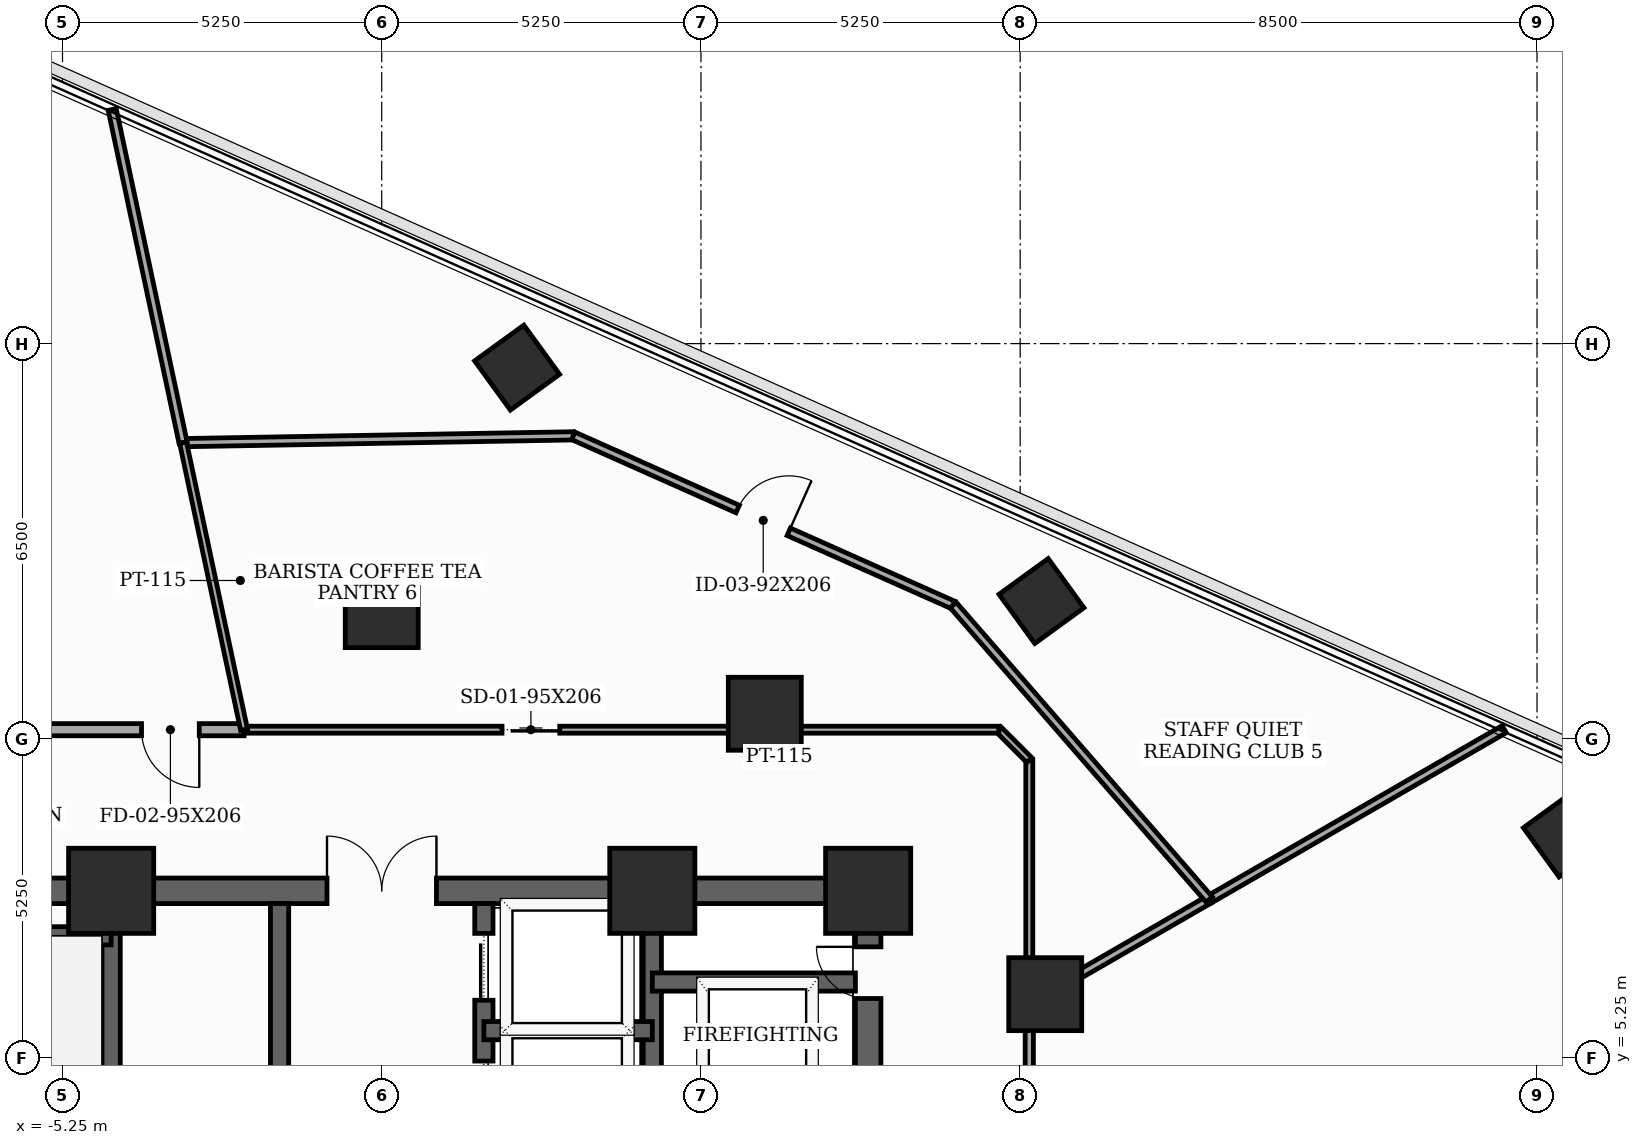
"""IFC4 building model, lengths in metres.
Left out: names, types, materials, properties, quantities, classifications, styles, units other than length and angle.
Written with IfcOpenShell. Run it as: python <this file> out.ifc"""

import sys

from ifc_helpers import new_model, si_unit, direction, frame, frame_2d, origin, origin_2d, place, context, subcontext, project, spatial, rectangle, extrude, element, fill, save


model = new_model("IFC4")
c1 = context("Model", 3, precision=1e-05, world=origin(), true_north=direction((0.0, 1.0)))
c2 = subcontext(c1, "Body", "Model", "MODEL_VIEW")
j1 = project(units=[si_unit("LENGTHUNIT", "METRE"), si_unit("PLANEANGLEUNIT", "RADIAN")], contexts=[c1])
p1 = place(None, origin())
s1 = spatial("IfcSite", under=j1, at=p1, CompositionType="ELEMENT")
p2 = place(p1, origin())
s2 = spatial("IfcBuilding", under=s1, at=p2, CompositionType="ELEMENT")
p3 = place(p2, frame((0.0, 0.0, 180.5)))
s3 = spatial("IfcBuildingStorey", under=s2, at=p3, CompositionType="ELEMENT", Elevation=180.5)
for number, where, z_axis, x_axis in (
    (1, (8.0, 8.0, 0.0), (0.0, 0.0, 1.0), (1.0, 0.0, 0.0)),
    (2, (4.45, 8.0, 0.0), (0.0, 0.0, 1.0), (1.0, 0.0, 0.0)),
    (3, (-4.45, 8.0, 0.0), (0.0, 0.0, 1.0), (1.0, 0.0, 0.0)),
):
    element("IfcColumn", number, at=place(p3, frame(where, z_axis=z_axis, x_axis=x_axis)), inside=s3, PredefinedType="COLUMN", context=c2, shape_type="SweptSolid", body=[
        extrude(rectangle(XDim=1.4, YDim=1.4, at=origin_2d()), origin(), (0.0, 0.0, 1.0), 3.7),
    ])
for number, where, z_axis, x_axis in (
    (4, (10.912, 6.3, 0.0), (0.0, 0.0, 1.0), (1.0, 0.0, 0.0)),
    (5, (6.3, 10.912, 0.0), (0.0, 0.0, 1.0), (1.0, 0.0, 0.0)),
    (6, (0.0, 12.6, 0.0), (0.0, 0.0, 1.0), (1.0, 0.0, 0.0)),
):
    element("IfcColumn", number, at=place(p3, frame(where, z_axis=z_axis, x_axis=x_axis)), inside=s3, PredefinedType="COLUMN", context=c2, shape_type="SweptSolid", body=[
        extrude(rectangle(XDim=1.2, YDim=1.2, at=origin_2d()), origin(), (0.0, 0.0, 1.0), 3.7),
    ])
for number, where, z_axis, x_axis in (
    (7, (19.474, 8.926, 0.0), (0.0, 0.0, 1.0), (0.809, 0.588, 0.0)),
    (8, (10.85, 12.766, 0.0), (0.0, 0.0, 1.0), (0.809, 0.588, 0.0)),
    (9, (2.227, 16.605, 0.0), (0.0, 0.0, 1.0), (0.809, 0.588, 0.0)),
):
    element("IfcColumn", number, at=place(p3, frame(where, z_axis=z_axis, x_axis=x_axis)), inside=s3, PredefinedType="COLUMN", context=c2, shape_type="SweptSolid", body=[
        extrude(rectangle(XDim=1.0, YDim=1.0, at=origin_2d()), origin(), (0.0, 0.0, 1.0), 3.7),
    ])
p4 = place(p3, frame((8.0, -8.0, 0.0), z_axis=(0.0, 0.0, 1.0), x_axis=(0.0, 1.0, 0.0)))
e10 = element("IfcWall", 10, at=p4, inside=s3, PredefinedType="SHEAR", context=c2, shape_type="SweptSolid", body=[
    extrude(rectangle(XDim=16.0, YDim=0.42, at=frame_2d((8.0, 0.0))), origin(), (0.0, 0.0, 1.0), 3.5),
])
p5 = place(p4, frame((9.6, 0.0, 0.0)))
e11 = element("IfcOpeningElement", 11, at=p5, cuts=e10, PredefinedType="OPENING", context=c2, shape_type="SweptSolid", body=[
    extrude(rectangle(XDim=1.05, YDim=2.15, at=frame_2d((0.525, 1.075))), frame((0.0, 0.22, 0.0), z_axis=(0.0, -1.0, 0.0), x_axis=(1.0, 0.0, 0.0)), (0.0, 0.0, 1.0), 0.44),
])
p6 = place(p4, frame((14.229, 0.0, 0.0)))
e12 = element("IfcOpeningElement", 12, at=p6, cuts=e10, PredefinedType="OPENING", context=c2, shape_type="SweptSolid", body=[
    extrude(rectangle(XDim=0.85, YDim=2.02, at=frame_2d((0.425, 1.01))), frame((0.0, 0.22, 0.0), z_axis=(0.0, -1.0, 0.0), x_axis=(1.0, 0.0, 0.0)), (0.0, 0.0, 1.0), 0.44),
])
p7 = place(p3, frame((-8.0, 8.0, 0.0), z_axis=(0.0, 0.0, 1.0), x_axis=(1.0, 0.0, 0.0)))
e13 = element("IfcWall", 13, at=p7, inside=s3, PredefinedType="SHEAR", context=c2, shape_type="SweptSolid", body=[
    extrude(rectangle(XDim=16.0, YDim=0.42, at=frame_2d((8.0, 0.0))), origin(), (0.0, 0.0, 1.0), 3.5),
])
p8 = place(p7, frame((7.1, 0.0, 0.0)))
e14 = element("IfcOpeningElement", 14, at=p8, cuts=e13, PredefinedType="OPENING", context=c2, shape_type="SweptSolid", body=[
    extrude(rectangle(XDim=1.8, YDim=2.15, at=frame_2d((0.9, 1.075))), frame((0.0, 0.22, 0.0), z_axis=(0.0, -1.0, 0.0), x_axis=(1.0, 0.0, 0.0)), (0.0, 0.0, 1.0), 0.44),
])
for number, where, z_axis, x_axis in (
    (15, (-4.45, -7.79, 0.0), (0.0, 0.0, 1.0), (0.0, 1.0, 0.0)),
    (16, (4.45, -7.79, 0.0), (0.0, 0.0, 1.0), (0.0, 1.0, 0.0)),
):
    element("IfcWall", number, at=place(p3, frame(where, z_axis=z_axis, x_axis=x_axis)), inside=s3, PredefinedType="SHEAR", context=c2, shape_type="SweptSolid", body=[
        extrude(rectangle(XDim=15.58, YDim=0.3, at=frame_2d((7.79, 0.0))), origin(), (0.0, 0.0, 1.0), 3.5),
    ])
for number, where, z_axis, x_axis in (
    (17, (-7.79, 7.26, 0.0), (0.0, 0.0, 1.0), (1.0, 0.0, 0.0)),
    (18, (4.45, 6.5, 0.0), (0.0, 0.0, 1.0), (1.0, 0.0, 0.0)),
):
    element("IfcWall", number, at=place(p3, frame(where, z_axis=z_axis, x_axis=x_axis)), inside=s3, PredefinedType="SHEAR", context=c2, shape_type="SweptSolid", body=[
        extrude(rectangle(XDim=3.34, YDim=0.3, at=frame_2d((1.67, 0.0))), origin(), (0.0, 0.0, 1.0), 3.5),
    ])
p9 = place(p3, frame((-1.68, -4.85, 0.0), z_axis=(0.0, 0.0, 1.0), x_axis=(0.0, 1.0, 0.0)))
e19 = element("IfcWall", 19, at=p9, inside=s3, PredefinedType="SHEAR", context=c2, shape_type="SweptSolid", body=[
    extrude(rectangle(XDim=12.64, YDim=0.3, at=frame_2d((6.32, 0.0))), origin(), (0.0, 0.0, 1.0), 3.5),
])
p10 = place(p9, frame((1.05, 0.0, 0.0)))
e20 = element("IfcOpeningElement", 20, at=p10, cuts=e19, PredefinedType="OPENING", context=c2, shape_type="SweptSolid", body=[
    extrude(rectangle(XDim=0.85, YDim=2.02, at=frame_2d((0.425, 1.01))), frame((0.0, 0.16, 0.0), z_axis=(0.0, -1.0, 0.0), x_axis=(1.0, 0.0, 0.0)), (0.0, 0.0, 1.0), 0.32),
])
p11 = place(p9, frame((6.8, 0.0, 0.0)))
e21 = element("IfcOpeningElement", 21, at=p11, cuts=e19, PredefinedType="OPENING", context=c2, shape_type="SweptSolid", body=[
    extrude(rectangle(XDim=0.95, YDim=2.1, at=frame_2d((0.475, 1.05))), frame((0.0, 0.16, 0.0), z_axis=(0.0, -1.0, 0.0), x_axis=(1.0, 0.0, 0.0)), (0.0, 0.0, 1.0), 0.32),
])
p12 = place(p3, frame((1.68, -4.85, 0.0), z_axis=(0.0, 0.0, 1.0), x_axis=(0.0, 1.0, 0.0)))
e22 = element("IfcWall", 22, at=p12, inside=s3, PredefinedType="SHEAR", context=c2, shape_type="SweptSolid", body=[
    extrude(rectangle(XDim=12.64, YDim=0.3, at=frame_2d((6.32, 0.0))), origin(), (0.0, 0.0, 1.0), 3.5),
])
p13 = place(p12, frame((0.55, 0.0, 0.0)))
e23 = element("IfcOpeningElement", 23, at=p13, cuts=e22, PredefinedType="OPENING", context=c2, shape_type="SweptSolid", body=[
    extrude(rectangle(XDim=1.1, YDim=2.1, at=frame_2d((0.55, 1.05))), frame((0.0, 0.16, 0.0), z_axis=(0.0, -1.0, 0.0), x_axis=(1.0, 0.0, 0.0)), (0.0, 0.0, 1.0), 0.32),
])
p14 = place(p12, frame((2.65, 0.0, 0.0)))
e24 = element("IfcOpeningElement", 24, at=p14, cuts=e22, PredefinedType="OPENING", context=c2, shape_type="SweptSolid", body=[
    extrude(rectangle(XDim=1.1, YDim=2.1, at=frame_2d((0.55, 1.05))), frame((0.0, 0.16, 0.0), z_axis=(0.0, -1.0, 0.0), x_axis=(1.0, 0.0, 0.0)), (0.0, 0.0, 1.0), 0.32),
])
p15 = place(p12, frame((4.75, 0.0, 0.0)))
e25 = element("IfcOpeningElement", 25, at=p15, cuts=e22, PredefinedType="OPENING", context=c2, shape_type="SweptSolid", body=[
    extrude(rectangle(XDim=1.1, YDim=2.1, at=frame_2d((0.55, 1.05))), frame((0.0, 0.16, 0.0), z_axis=(0.0, -1.0, 0.0), x_axis=(1.0, 0.0, 0.0)), (0.0, 0.0, 1.0), 0.32),
])
p16 = place(p12, frame((6.85, 0.0, 0.0)))
e26 = element("IfcOpeningElement", 26, at=p16, cuts=e22, PredefinedType="OPENING", context=c2, shape_type="SweptSolid", body=[
    extrude(rectangle(XDim=1.1, YDim=2.1, at=frame_2d((0.55, 1.05))), frame((0.0, 0.16, 0.0), z_axis=(0.0, -1.0, 0.0), x_axis=(1.0, 0.0, 0.0)), (0.0, 0.0, 1.0), 0.32),
])
p17 = place(p12, frame((8.95, 0.0, 0.0)))
e27 = element("IfcOpeningElement", 27, at=p17, cuts=e22, PredefinedType="OPENING", context=c2, shape_type="SweptSolid", body=[
    extrude(rectangle(XDim=1.1, YDim=2.1, at=frame_2d((0.55, 1.05))), frame((0.0, 0.16, 0.0), z_axis=(0.0, -1.0, 0.0), x_axis=(1.0, 0.0, 0.0)), (0.0, 0.0, 1.0), 0.32),
])
p18 = place(p12, frame((11.05, 0.0, 0.0)))
e28 = element("IfcOpeningElement", 28, at=p18, cuts=e22, PredefinedType="OPENING", context=c2, shape_type="SweptSolid", body=[
    extrude(rectangle(XDim=1.1, YDim=2.1, at=frame_2d((0.55, 1.05))), frame((0.0, 0.16, 0.0), z_axis=(0.0, -1.0, 0.0), x_axis=(1.0, 0.0, 0.0)), (0.0, 0.0, 1.0), 0.32),
])
p19 = place(p3, frame((1.68, 5.7, 0.0), z_axis=(0.0, 0.0, 1.0), x_axis=(1.0, 0.0, 0.0)))
e29 = element("IfcWall", 29, at=p19, inside=s3, PredefinedType="SHEAR", context=c2, shape_type="SweptSolid", body=[
    extrude(rectangle(XDim=2.77, YDim=0.3, at=frame_2d((1.385, 0.0))), origin(), (0.0, 0.0, 1.0), 3.5),
])
p20 = place(p3, frame((10.65, -6.149, 0.0), z_axis=(0.0, 0.0, 1.0), x_axis=(0.0, 1.0, 0.0)))
e30 = element("IfcWall", 30, at=p20, inside=s3, PredefinedType="PARTITIONING", context=c2, shape_type="SweptSolid", body=[
    extrude(rectangle(XDim=12.298, YDim=0.135, at=frame_2d((6.149, 0.0))), origin(), (0.0, 0.0, 1.0), 2.885),
])
p21 = place(p20, frame((4.198, 0.0, 0.0)))
e31 = element("IfcOpeningElement", 31, at=p21, cuts=e30, PredefinedType="OPENING", context=c2, shape_type="SweptSolid", body=[
    extrude(rectangle(XDim=0.95, YDim=2.1, at=frame_2d((0.475, 1.05))), frame((0.0, 0.077, 0.0), z_axis=(0.0, -1.0, 0.0), x_axis=(1.0, 0.0, 0.0)), (0.0, 0.0, 1.0), 0.155),
])
p22 = place(p3, frame((10.65, 6.149, 0.0), z_axis=(0.0, 0.0, 1.0), x_axis=(0.0, 1.0, 0.0)))
e32 = element("IfcWall", 32, at=p22, inside=s3, PredefinedType="PARTITIONING", context=c2, shape_type="SweptSolid", body=[
    extrude(rectangle(XDim=4.001, YDim=0.115, at=frame_2d((2.0, 0.0))), origin(), (0.0, 0.0, 1.0), 2.885),
])
p23 = place(p3, frame((10.65, 10.15, 0.0), z_axis=(0.0, 0.0, 1.0), x_axis=(-0.707106781187, 0.707106781187, 0.0)))
e33 = element("IfcWall", 33, at=p23, inside=s3, PredefinedType="PARTITIONING", context=c2, shape_type="SweptSolid", body=[
    extrude(rectangle(XDim=0.707, YDim=0.115, at=frame_2d((0.354, 0.0))), origin(), (0.0, 0.0, 1.0), 3.5),
])
p24 = place(p3, frame((10.15, 10.65, 0.0), z_axis=(0.0, 0.0, 1.0), x_axis=(-1.0, 0.0, 0.0)))
e34 = element("IfcWall", 34, at=p24, inside=s3, PredefinedType="PARTITIONING", context=c2, shape_type="SweptSolid", body=[
    extrude(rectangle(XDim=12.414, YDim=0.115, at=frame_2d((6.207, 0.0))), origin(), (0.0, 0.0, 1.0), 2.085),
])
p25 = place(p24, frame((7.222, 0.0, 0.0)))
e35 = element("IfcOpeningElement", 35, at=p25, cuts=e34, PredefinedType="OPENING", context=c2, shape_type="SweptSolid", body=[
    extrude(rectangle(XDim=0.95, YDim=2.035, at=frame_2d((0.475, 1.018))), frame((0.0, 0.067, 0.0), z_axis=(0.0, -1.0, 0.0), x_axis=(1.0, 0.0, 0.0)), (0.0, 0.0, 1.0), 0.135),
])
p26 = place(p3, frame((-2.264, 10.65, 0.0), z_axis=(0.0, 0.0, 1.0), x_axis=(-1.0, 0.0, 0.0)))
e36 = element("IfcWall", 36, at=p26, inside=s3, PredefinedType="SOLIDWALL", context=c2, shape_type="SweptSolid", body=[
    extrude(rectangle(XDim=6.057, YDim=0.2, at=frame_2d((3.029, 0.0))), origin(), (0.0, 0.0, 1.0), 2.085),
])
p27 = place(p26, frame((0.736, 0.0, 0.0)))
e37 = element("IfcOpeningElement", 37, at=p27, cuts=e36, PredefinedType="OPENING", context=c2, shape_type="SweptSolid", body=[
    extrude(rectangle(XDim=0.95, YDim=2.035, at=frame_2d((0.475, 1.018))), frame((0.0, 0.11, 0.0), z_axis=(0.0, -1.0, 0.0), x_axis=(1.0, 0.0, 0.0)), (0.0, 0.0, 1.0), 0.22),
])
p28 = place(p3, frame((18.46, 10.658, 0.0), z_axis=(0.0, 0.0, 1.0), x_axis=(-0.865978736514, -0.500080821373, 0.0)))
e38 = element("IfcWall", 38, at=p28, inside=s3, PredefinedType="PARTITIONING", context=c2, shape_type="SweptSolid", body=[
    extrude(rectangle(XDim=5.602, YDim=0.135, at=frame_2d((2.801, 0.0))), origin(), (0.0, 0.0, 1.0), 2.085),
])
p29 = place(p3, frame((13.609, 7.857, 0.0), z_axis=(0.0, 0.0, 1.0), x_axis=(-0.866071357471, -0.499920397431, 0.0)))
e39 = element("IfcWall", 39, at=p29, inside=s3, PredefinedType="PARTITIONING", context=c2, shape_type="SweptSolid", body=[
    extrude(rectangle(XDim=3.417, YDim=0.135, at=frame_2d((1.708, 0.0))), origin(), (0.0, 0.0, 1.0), 2.085),
])
p30 = place(p3, frame((-3.267, 15.371, 0.0), z_axis=(0.0, 0.0, 1.0), x_axis=(0.999848218389, 0.017422404658, 0.0)))
e40 = element("IfcWall", 40, at=p30, inside=s3, PredefinedType="PARTITIONING", context=c2, shape_type="SweptSolid", body=[
    extrude(rectangle(XDim=6.418, YDim=0.135, at=frame_2d((3.209, 0.0))), origin(), (0.0, 0.0, 1.0), 2.085),
])
p31 = place(p3, frame((3.15, 15.483, 0.0), z_axis=(0.0, 0.0, 1.0), x_axis=(0.913536073518, -0.406757719511, 0.0)))
e41 = element("IfcWall", 41, at=p31, inside=s3, PredefinedType="PARTITIONING", context=c2, shape_type="SweptSolid", body=[
    extrude(rectangle(XDim=6.839, YDim=0.135, at=frame_2d((3.42, 0.0))), origin(), (0.0, 0.0, 1.0), 2.085),
])
p32 = place(p31, frame((2.96, 0.0, 0.0)))
e42 = element("IfcOpeningElement", 42, at=p32, cuts=e41, PredefinedType="OPENING", context=c2, shape_type="SweptSolid", body=[
    extrude(rectangle(XDim=0.92, YDim=2.035, at=frame_2d((0.46, 1.018))), frame((0.0, 0.077, 0.0), z_axis=(0.0, -1.0, 0.0), x_axis=(1.0, 0.0, 0.0)), (0.0, 0.0, 1.0), 0.155),
])
p33 = place(p3, frame((9.398, 12.701, 0.0), z_axis=(0.0, 0.0, 1.0), x_axis=(0.656069468174, -0.754700505452, 0.0)))
e43 = element("IfcWall", 43, at=p33, inside=s3, PredefinedType="PARTITIONING", context=c2, shape_type="SweptSolid", body=[
    extrude(rectangle(XDim=6.418, YDim=0.135, at=frame_2d((3.209, 0.0))), origin(), (0.0, 0.0, 1.0), 2.085),
])
p34 = place(p3, frame((-4.432, 20.851, 0.0), z_axis=(0.0, 0.0, 1.0), x_axis=(0.208002083798, -0.978128382747, 0.0)))
e44 = element("IfcWall", 44, at=p34, inside=s3, PredefinedType="PARTITIONING", context=c2, shape_type="SweptSolid", body=[
    extrude(rectangle(XDim=5.602, YDim=0.135, at=frame_2d((2.801, 0.0))), origin(), (0.0, 0.0, 1.0), 2.085),
])
p35 = place(p3, frame((-3.267, 15.371, 0.0), z_axis=(0.0, 0.0, 1.0), x_axis=(0.207843026781, -0.978162193207, 0.0)))
e45 = element("IfcWall", 45, at=p35, inside=s3, PredefinedType="PARTITIONING", context=c2, shape_type="SweptSolid", body=[
    extrude(rectangle(XDim=4.827, YDim=0.115, at=frame_2d((2.413, 0.0))), origin(), (0.0, 0.0, 1.0), 2.885),
])
p36 = place(p6, origin())
e46 = element("IfcDoor", 46, at=p36, inside=s3, OperationType="SINGLE_SWING_RIGHT", PredefinedType="TRAPDOOR", context=c2, shape_type="SweptSolid", body=[
    extrude(rectangle(XDim=0.85, YDim=2.02, at=frame_2d((0.425, 1.01))), frame((0.0, 0.025, 0.0), z_axis=(0.0, -1.0, 0.0), x_axis=(1.0, 0.0, 0.0)), (0.0, 0.0, 1.0), 0.05),
])
fill(e12, e46)
p37 = place(p8, origin())
e47 = element("IfcDoor", 47, at=p37, inside=s3, OperationType="DOUBLE_DOOR_SINGLE_SWING", PredefinedType="DOOR", context=c2, shape_type="SweptSolid", body=[
    extrude(rectangle(XDim=1.8, YDim=2.15, at=frame_2d((0.9, 1.075))), frame((0.0, 0.025, 0.0), z_axis=(0.0, -1.0, 0.0), x_axis=(1.0, 0.0, 0.0)), (0.0, 0.0, 1.0), 0.05),
])
fill(e14, e47)
p38 = place(p17, origin())
e48 = element("IfcDoor", 48, at=p38, inside=s3, OperationType="SLIDING_TO_LEFT", PredefinedType="DOOR", context=c2, shape_type="SweptSolid", body=[
    extrude(rectangle(XDim=1.1, YDim=2.1, at=frame_2d((0.55, 1.05))), frame((0.0, 0.025, 0.0), z_axis=(0.0, -1.0, 0.0), x_axis=(1.0, 0.0, 0.0)), (0.0, 0.0, 1.0), 0.05),
])
fill(e27, e48)
p39 = place(p18, origin())
e49 = element("IfcDoor", 49, at=p39, inside=s3, OperationType="SLIDING_TO_LEFT", PredefinedType="DOOR", context=c2, shape_type="SweptSolid", body=[
    extrude(rectangle(XDim=1.1, YDim=2.1, at=frame_2d((0.55, 1.05))), frame((0.0, 0.025, 0.0), z_axis=(0.0, -1.0, 0.0), x_axis=(1.0, 0.0, 0.0)), (0.0, 0.0, 1.0), 0.05),
])
fill(e28, e49)
p40 = place(p25, origin())
e50 = element("IfcDoor", 50, at=p40, inside=s3, OperationType="SLIDING_TO_LEFT", PredefinedType="DOOR", context=c2, shape_type="SweptSolid", body=[
    extrude(rectangle(XDim=0.95, YDim=2.035, at=frame_2d((0.475, 1.018))), frame((0.0, 0.025, 0.0), z_axis=(0.0, -1.0, 0.0), x_axis=(1.0, 0.0, 0.0)), (0.0, 0.0, 1.0), 0.05),
])
fill(e35, e50)
p41 = place(p27, origin())
e51 = element("IfcDoor", 51, at=p41, inside=s3, OperationType="SINGLE_SWING_LEFT", PredefinedType="DOOR", context=c2, shape_type="SweptSolid", body=[
    extrude(rectangle(XDim=0.95, YDim=2.035, at=frame_2d((0.475, 1.018))), frame((0.0, 0.025, 0.0), z_axis=(0.0, -1.0, 0.0), x_axis=(1.0, 0.0, 0.0)), (0.0, 0.0, 1.0), 0.05),
])
fill(e37, e51)
p42 = place(p32, origin())
e52 = element("IfcDoor", 52, at=p42, inside=s3, OperationType="SINGLE_SWING_RIGHT", PredefinedType="DOOR", context=c2, shape_type="SweptSolid", body=[
    extrude(rectangle(XDim=0.92, YDim=2.035, at=frame_2d((0.46, 1.018))), frame((0.0, 0.025, 0.0), z_axis=(0.0, -1.0, 0.0), x_axis=(1.0, 0.0, 0.0)), (0.0, 0.0, 1.0), 0.05),
])
fill(e42, e52)
save(model, sys.argv[1])
